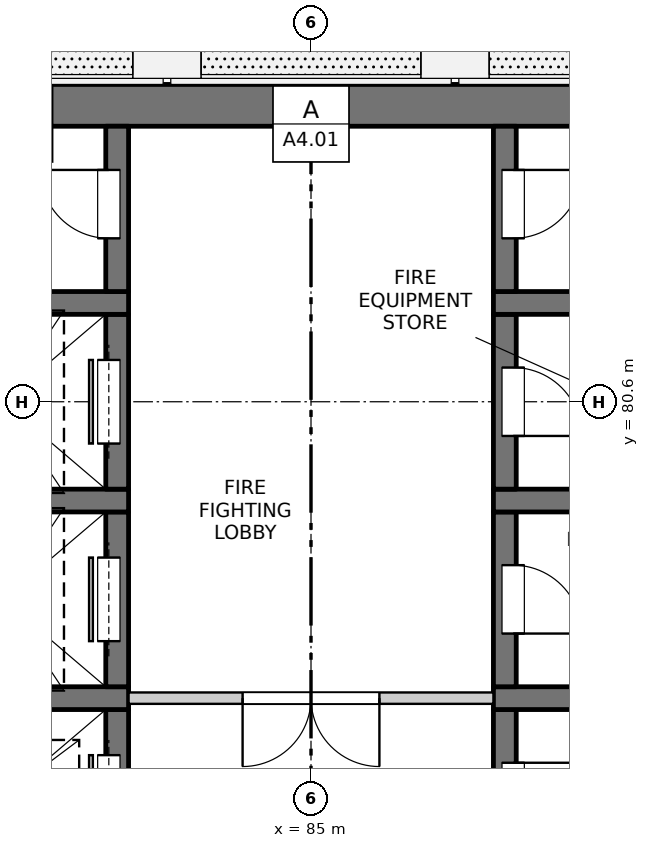
"""IFC4 building model, lengths in metres.
Left out: names, types, materials, properties, quantities, classifications, styles, units other than length and angle.
Written with IfcOpenShell. Run it as: python <this file> out.ifc"""

import sys

from ifc_helpers import new_model, si_unit, direction, frame, frame_2d, origin, place, context, subcontext, project, spatial, rectangle, extrude, element, fill, save


model = new_model("IFC4")
c1 = context("Model", 3, precision=1e-05, world=origin(), true_north=direction((0.0, 1.0)))
c2 = subcontext(c1, "Body", "Model", "MODEL_VIEW")
j1 = project(units=[si_unit("LENGTHUNIT", "METRE"), si_unit("PLANEANGLEUNIT", "RADIAN")], contexts=[c1])
p1 = place(None, origin())
s1 = spatial("IfcSite", under=j1, at=p1, CompositionType="ELEMENT")
p2 = place(p1, origin())
s2 = spatial("IfcBuilding", under=s1, at=p2, CompositionType="ELEMENT")
p3 = place(p2, frame((0.0, 0.0, 113.5)))
s3 = spatial("IfcBuildingStorey", under=s2, at=p3, CompositionType="ELEMENT", Elevation=113.5)
p4 = place(p3, frame((75.525, 84.5, -0.25), z_axis=(0.0, 0.0, 1.0), x_axis=(1.0, 0.0, 0.0)))
e1 = element("IfcWall", 1, at=p4, inside=s3, PredefinedType="SOLIDWALL", context=c2, shape_type="SweptSolid", body=[
    extrude(rectangle(XDim=18.95, YDim=0.55, at=frame_2d((9.475, 0.0))), origin(), (0.0, 0.0, 1.0), 3.35),
])
p5 = place(p3, frame((82.45, 74.25, -0.25), z_axis=(0.0, 0.0, 1.0), x_axis=(0.0, 1.0, 0.0)))
e2 = element("IfcWall", 2, at=p5, inside=s3, PredefinedType="SOLIDWALL", context=c2, shape_type="SweptSolid", body=[
    extrude(rectangle(XDim=2.3, YDim=0.3, at=frame_2d((1.15, 0.0))), origin(), (0.0, 0.0, 1.0), 3.35),
])
p6 = place(p5, frame((0.6, 0.0, 0.25)))
e3 = element("IfcOpeningElement", 3, at=p6, cuts=e2, PredefinedType="OPENING", context=c2, shape_type="SweptSolid", body=[
    extrude(rectangle(XDim=1.1, YDim=2.1, at=frame_2d((0.55, 1.05))), frame((0.0, 0.16, 0.0), z_axis=(0.0, -1.0, 0.0), x_axis=(1.0, 0.0, 0.0)), (0.0, 0.0, 1.0), 0.32),
])
p7 = place(p3, frame((79.6, 76.7, -0.25), z_axis=(0.0, 0.0, 1.0), x_axis=(1.0, 0.0, 0.0)))
e4 = element("IfcWall", 4, at=p7, inside=s3, PredefinedType="SOLIDWALL", context=c2, shape_type="SweptSolid", body=[
    extrude(rectangle(XDim=3.0, YDim=0.3, at=frame_2d((1.5, 0.0))), origin(), (0.0, 0.0, 1.0), 3.35),
])
p8 = place(p3, frame((82.45, 76.85, -0.25), z_axis=(0.0, 0.0, 1.0), x_axis=(0.0, 1.0, 0.0)))
e5 = element("IfcWall", 5, at=p8, inside=s3, PredefinedType="SOLIDWALL", context=c2, shape_type="SweptSolid", body=[
    extrude(rectangle(XDim=2.3, YDim=0.3, at=frame_2d((1.15, 0.0))), origin(), (0.0, 0.0, 1.0), 3.35),
])
p9 = place(p8, frame((0.6, 0.0, 0.25)))
e6 = element("IfcOpeningElement", 6, at=p9, cuts=e5, PredefinedType="OPENING", context=c2, shape_type="SweptSolid", body=[
    extrude(rectangle(XDim=1.1, YDim=2.1, at=frame_2d((0.55, 1.05))), frame((0.0, 0.16, 0.0), z_axis=(0.0, -1.0, 0.0), x_axis=(1.0, 0.0, 0.0)), (0.0, 0.0, 1.0), 0.32),
])
p10 = place(p3, frame((79.6, 79.3, -0.25), z_axis=(0.0, 0.0, 1.0), x_axis=(1.0, 0.0, 0.0)))
e7 = element("IfcWall", 7, at=p10, inside=s3, PredefinedType="SOLIDWALL", context=c2, shape_type="SweptSolid", body=[
    extrude(rectangle(XDim=3.0, YDim=0.3, at=frame_2d((1.5, 0.0))), origin(), (0.0, 0.0, 1.0), 3.35),
])
p11 = place(p3, frame((82.45, 79.45, -0.25), z_axis=(0.0, 0.0, 1.0), x_axis=(0.0, 1.0, 0.0)))
e8 = element("IfcWall", 8, at=p11, inside=s3, PredefinedType="SOLIDWALL", context=c2, shape_type="SweptSolid", body=[
    extrude(rectangle(XDim=2.3, YDim=0.3, at=frame_2d((1.15, 0.0))), origin(), (0.0, 0.0, 1.0), 3.35),
])
p12 = place(p11, frame((0.6, 0.0, 0.25)))
e9 = element("IfcOpeningElement", 9, at=p12, cuts=e8, PredefinedType="OPENING", context=c2, shape_type="SweptSolid", body=[
    extrude(rectangle(XDim=1.1, YDim=2.1, at=frame_2d((0.55, 1.05))), frame((0.0, 0.16, 0.0), z_axis=(0.0, -1.0, 0.0), x_axis=(1.0, 0.0, 0.0)), (0.0, 0.0, 1.0), 0.32),
])
p13 = place(p3, frame((79.6, 81.9, -0.25), z_axis=(0.0, 0.0, 1.0), x_axis=(1.0, 0.0, 0.0)))
e10 = element("IfcWall", 10, at=p13, inside=s3, PredefinedType="SOLIDWALL", context=c2, shape_type="SweptSolid", body=[
    extrude(rectangle(XDim=3.0, YDim=0.3, at=frame_2d((1.5, 0.0))), origin(), (0.0, 0.0, 1.0), 3.35),
])
p14 = place(p3, frame((82.45, 82.05, -0.25), z_axis=(0.0, 0.0, 1.0), x_axis=(0.0, 1.0, 0.0)))
e11 = element("IfcWall", 11, at=p14, inside=s3, PredefinedType="SOLIDWALL", context=c2, shape_type="SweptSolid", body=[
    extrude(rectangle(XDim=2.175, YDim=0.3, at=frame_2d((1.087, 0.0))), origin(), (0.0, 0.0, 1.0), 3.35),
])
p15 = place(p14, frame((0.7, 0.0, 0.25)))
e12 = element("IfcOpeningElement", 12, at=p15, cuts=e11, PredefinedType="OPENING", context=c2, shape_type="SweptSolid", body=[
    extrude(rectangle(XDim=0.9, YDim=2.1, at=frame_2d((0.45, 1.05))), frame((0.0, 0.16, 0.0), z_axis=(0.0, -1.0, 0.0), x_axis=(1.0, 0.0, 0.0)), (0.0, 0.0, 1.0), 0.32),
])
p16 = place(p3, frame((87.55, 74.25, -0.25), z_axis=(0.0, 0.0, 1.0), x_axis=(0.0, 1.0, 0.0)))
e13 = element("IfcWall", 13, at=p16, inside=s3, PredefinedType="SOLIDWALL", context=c2, shape_type="SweptSolid", body=[
    extrude(rectangle(XDim=2.3, YDim=0.3, at=frame_2d((1.15, 0.0))), origin(), (0.0, 0.0, 1.0), 3.35),
])
p17 = place(p16, frame((0.7, 0.0, 0.25)))
e14 = element("IfcOpeningElement", 14, at=p17, cuts=e13, PredefinedType="OPENING", context=c2, shape_type="SweptSolid", body=[
    extrude(rectangle(XDim=0.9, YDim=2.1, at=frame_2d((0.45, 1.05))), frame((0.0, 0.16, 0.0), z_axis=(0.0, -1.0, 0.0), x_axis=(1.0, 0.0, 0.0)), (0.0, 0.0, 1.0), 0.32),
])
p18 = place(p3, frame((87.4, 76.7, -0.25), z_axis=(0.0, 0.0, 1.0), x_axis=(1.0, 0.0, 0.0)))
e15 = element("IfcWall", 15, at=p18, inside=s3, PredefinedType="SOLIDWALL", context=c2, shape_type="SweptSolid", body=[
    extrude(rectangle(XDim=3.0, YDim=0.3, at=frame_2d((1.5, 0.0))), origin(), (0.0, 0.0, 1.0), 3.35),
])
p19 = place(p3, frame((87.55, 76.85, -0.25), z_axis=(0.0, 0.0, 1.0), x_axis=(0.0, 1.0, 0.0)))
e16 = element("IfcWall", 16, at=p19, inside=s3, PredefinedType="SOLIDWALL", context=c2, shape_type="SweptSolid", body=[
    extrude(rectangle(XDim=2.3, YDim=0.3, at=frame_2d((1.15, 0.0))), origin(), (0.0, 0.0, 1.0), 3.35),
])
p20 = place(p19, frame((0.7, 0.0, 0.25)))
e17 = element("IfcOpeningElement", 17, at=p20, cuts=e16, PredefinedType="OPENING", context=c2, shape_type="SweptSolid", body=[
    extrude(rectangle(XDim=0.9, YDim=2.1, at=frame_2d((0.45, 1.05))), frame((0.0, 0.16, 0.0), z_axis=(0.0, -1.0, 0.0), x_axis=(1.0, 0.0, 0.0)), (0.0, 0.0, 1.0), 0.32),
])
p21 = place(p3, frame((87.4, 79.3, -0.25), z_axis=(0.0, 0.0, 1.0), x_axis=(1.0, 0.0, 0.0)))
e18 = element("IfcWall", 18, at=p21, inside=s3, PredefinedType="SOLIDWALL", context=c2, shape_type="SweptSolid", body=[
    extrude(rectangle(XDim=3.0, YDim=0.3, at=frame_2d((1.5, 0.0))), origin(), (0.0, 0.0, 1.0), 3.35),
])
p22 = place(p3, frame((87.55, 79.45, -0.25), z_axis=(0.0, 0.0, 1.0), x_axis=(0.0, 1.0, 0.0)))
e19 = element("IfcWall", 19, at=p22, inside=s3, PredefinedType="SOLIDWALL", context=c2, shape_type="SweptSolid", body=[
    extrude(rectangle(XDim=2.3, YDim=0.3, at=frame_2d((1.15, 0.0))), origin(), (0.0, 0.0, 1.0), 3.35),
])
p23 = place(p22, frame((0.7, 0.0, 0.25)))
e20 = element("IfcOpeningElement", 20, at=p23, cuts=e19, PredefinedType="OPENING", context=c2, shape_type="SweptSolid", body=[
    extrude(rectangle(XDim=0.9, YDim=2.1, at=frame_2d((0.45, 1.05))), frame((0.0, 0.16, 0.0), z_axis=(0.0, -1.0, 0.0), x_axis=(1.0, 0.0, 0.0)), (0.0, 0.0, 1.0), 0.32),
])
p24 = place(p3, frame((87.4, 81.9, -0.25), z_axis=(0.0, 0.0, 1.0), x_axis=(1.0, 0.0, 0.0)))
e21 = element("IfcWall", 21, at=p24, inside=s3, PredefinedType="SOLIDWALL", context=c2, shape_type="SweptSolid", body=[
    extrude(rectangle(XDim=3.0, YDim=0.3, at=frame_2d((1.5, 0.0))), origin(), (0.0, 0.0, 1.0), 3.35),
])
p25 = place(p3, frame((87.55, 82.05, -0.25), z_axis=(0.0, 0.0, 1.0), x_axis=(0.0, 1.0, 0.0)))
e22 = element("IfcWall", 22, at=p25, inside=s3, PredefinedType="SOLIDWALL", context=c2, shape_type="SweptSolid", body=[
    extrude(rectangle(XDim=2.175, YDim=0.3, at=frame_2d((1.087, 0.0))), origin(), (0.0, 0.0, 1.0), 3.35),
])
p26 = place(p25, frame((0.7, 0.0, 0.25)))
e23 = element("IfcOpeningElement", 23, at=p26, cuts=e22, PredefinedType="OPENING", context=c2, shape_type="SweptSolid", body=[
    extrude(rectangle(XDim=0.9, YDim=2.1, at=frame_2d((0.45, 1.05))), frame((0.0, 0.16, 0.0), z_axis=(0.0, -1.0, 0.0), x_axis=(1.0, 0.0, 0.0)), (0.0, 0.0, 1.0), 0.32),
])
p27 = place(p3, frame((82.6, 76.7, 0.0), z_axis=(0.0, 0.0, 1.0), x_axis=(1.0, 0.0, 0.0)))
e24 = element("IfcWall", 24, at=p27, inside=s3, PredefinedType="PARTITIONING", context=c2, shape_type="SweptSolid", body=[
    extrude(rectangle(XDim=4.8, YDim=0.15, at=frame_2d((2.4, 0.0))), origin(), (0.0, 0.0, 1.0), 3.1),
])
p28 = place(p27, frame((1.5, 0.0, 0.0)))
e25 = element("IfcOpeningElement", 25, at=p28, cuts=e24, PredefinedType="OPENING", context=c2, shape_type="SweptSolid", body=[
    extrude(rectangle(XDim=1.8, YDim=2.1, at=frame_2d((0.9, 1.05))), frame((0.0, 0.085, 0.0), z_axis=(0.0, -1.0, 0.0), x_axis=(1.0, 0.0, 0.0)), (0.0, 0.0, 1.0), 0.17),
])
p29 = place(p6, origin())
e26 = element("IfcDoor", 26, at=p29, inside=s3, OperationType="SLIDING_TO_LEFT", PredefinedType="DOOR", context=c2, shape_type="SweptSolid", body=[
    extrude(rectangle(XDim=1.1, YDim=2.1, at=frame_2d((0.55, 1.05))), frame((0.0, 0.135, 0.0), z_axis=(0.0, -1.0, 0.0), x_axis=(1.0, 0.0, 0.0)), (0.0, 0.0, 1.0), 0.05),
])
fill(e3, e26)
p30 = place(p17, origin())
e27 = element("IfcDoor", 27, at=p30, inside=s3, OperationType="SINGLE_SWING_LEFT", PredefinedType="DOOR", context=c2, shape_type="SweptSolid", body=[
    extrude(rectangle(XDim=0.9, YDim=2.1, at=frame_2d((0.45, 1.05))), frame((0.0, -0.085, 0.0), z_axis=(0.0, -1.0, 0.0), x_axis=(1.0, 0.0, 0.0)), (0.0, 0.0, 1.0), 0.05),
])
fill(e14, e27)
p31 = place(p28, origin())
e28 = element("IfcDoor", 28, at=p31, inside=s3, OperationType="DOUBLE_DOOR_SINGLE_SWING", PredefinedType="DOOR", context=c2, shape_type="SweptSolid", body=[
    extrude(rectangle(XDim=1.8, YDim=2.1, at=frame_2d((0.9, 1.05))), frame((0.0, 0.025, 0.0), z_axis=(0.0, -1.0, 0.0), x_axis=(1.0, 0.0, 0.0)), (0.0, 0.0, 1.0), 0.05),
])
fill(e25, e28)
p32 = place(p9, origin())
e29 = element("IfcDoor", 29, at=p32, inside=s3, OperationType="SLIDING_TO_LEFT", PredefinedType="DOOR", context=c2, shape_type="SweptSolid", body=[
    extrude(rectangle(XDim=1.1, YDim=2.1, at=frame_2d((0.55, 1.05))), frame((0.0, 0.135, 0.0), z_axis=(0.0, -1.0, 0.0), x_axis=(1.0, 0.0, 0.0)), (0.0, 0.0, 1.0), 0.05),
])
fill(e6, e29)
p33 = place(p20, origin())
e30 = element("IfcDoor", 30, at=p33, inside=s3, OperationType="SINGLE_SWING_RIGHT", PredefinedType="DOOR", context=c2, shape_type="SweptSolid", body=[
    extrude(rectangle(XDim=0.9, YDim=2.1, at=frame_2d((0.45, 1.05))), frame((0.0, -0.085, 0.0), z_axis=(0.0, -1.0, 0.0), x_axis=(1.0, 0.0, 0.0)), (0.0, 0.0, 1.0), 0.05),
])
fill(e17, e30)
p34 = place(p12, origin())
e31 = element("IfcDoor", 31, at=p34, inside=s3, OperationType="SLIDING_TO_LEFT", PredefinedType="DOOR", context=c2, shape_type="SweptSolid", body=[
    extrude(rectangle(XDim=1.1, YDim=2.1, at=frame_2d((0.55, 1.05))), frame((0.0, 0.135, 0.0), z_axis=(0.0, -1.0, 0.0), x_axis=(1.0, 0.0, 0.0)), (0.0, 0.0, 1.0), 0.05),
])
fill(e9, e31)
p35 = place(p23, origin())
e32 = element("IfcDoor", 32, at=p35, inside=s3, OperationType="SINGLE_SWING_RIGHT", PredefinedType="DOOR", context=c2, shape_type="SweptSolid", body=[
    extrude(rectangle(XDim=0.9, YDim=2.1, at=frame_2d((0.45, 1.05))), frame((0.0, -0.085, 0.0), z_axis=(0.0, -1.0, 0.0), x_axis=(1.0, 0.0, 0.0)), (0.0, 0.0, 1.0), 0.05),
])
fill(e20, e32)
p36 = place(p15, origin())
e33 = element("IfcDoor", 33, at=p36, inside=s3, OperationType="SINGLE_SWING_RIGHT", PredefinedType="DOOR", context=c2, shape_type="SweptSolid", body=[
    extrude(rectangle(XDim=0.9, YDim=2.1, at=frame_2d((0.45, 1.05))), frame((0.0, 0.135, 0.0), z_axis=(0.0, -1.0, 0.0), x_axis=(1.0, 0.0, 0.0)), (0.0, 0.0, 1.0), 0.05),
])
fill(e12, e33)
p37 = place(p26, origin())
e34 = element("IfcDoor", 34, at=p37, inside=s3, OperationType="SINGLE_SWING_LEFT", PredefinedType="DOOR", context=c2, shape_type="SweptSolid", body=[
    extrude(rectangle(XDim=0.9, YDim=2.1, at=frame_2d((0.45, 1.05))), frame((0.0, -0.085, 0.0), z_axis=(0.0, -1.0, 0.0), x_axis=(1.0, 0.0, 0.0)), (0.0, 0.0, 1.0), 0.05),
])
fill(e23, e34)
save(model, sys.argv[1])
